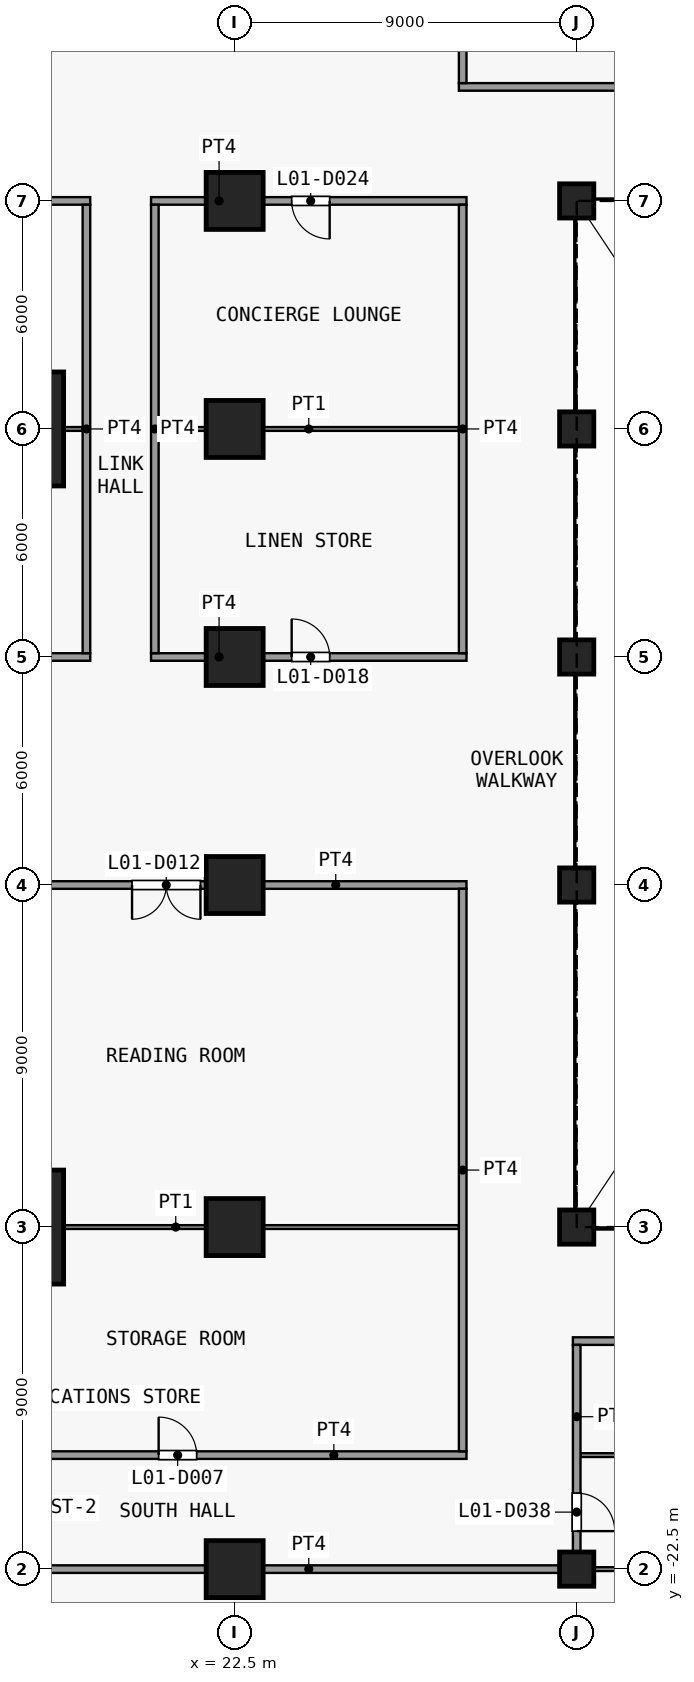
"""IFC4 building model, lengths in metres.
Left out: names, types, materials, properties, quantities, classifications, styles, units other than length and angle.
Written with IfcOpenShell. Run it as: python <this file> out.ifc"""

import sys

from ifc_helpers import new_model, si_unit, direction, frame, frame_2d, origin, origin_2d, place, context, subcontext, project, spatial, rectangle, extrude, element, fill, save


model = new_model("IFC4")
c1 = context("Model", 3, precision=1e-05, world=origin(), true_north=direction((0.0, 1.0)))
c2 = subcontext(c1, "Body", "Model", "MODEL_VIEW")
j1 = project(units=[si_unit("LENGTHUNIT", "METRE"), si_unit("PLANEANGLEUNIT", "RADIAN")], contexts=[c1])
p1 = place(None, origin())
s1 = spatial("IfcSite", under=j1, at=p1, CompositionType="ELEMENT")
p2 = place(p1, origin())
s2 = spatial("IfcBuilding", under=s1, at=p2, CompositionType="ELEMENT")
p3 = place(p2, frame((0.0, 0.0, 8.0)))
s3 = spatial("IfcBuildingStorey", under=s2, at=p3, CompositionType="ELEMENT", Elevation=8.0)
for number, where, z_axis, x_axis in (
    (1, (16.5, -13.5, 0.0), (0.0, 0.0, 1.0), (1.0, 0.0, 0.0)),
    (2, (16.5, 7.5, 0.0), (0.0, 0.0, 1.0), (1.0, 0.0, 0.0)),
):
    element("IfcColumn", number, at=place(p3, frame(where, z_axis=z_axis, x_axis=x_axis)), inside=s3, PredefinedType="COLUMN", context=c2, shape_type="SweptSolid", body=[
        extrude(rectangle(XDim=3.0, YDim=3.0, at=origin_2d()), origin(), (0.0, 0.0, 1.0), 5.5),
    ])
for number, where, z_axis, x_axis in (
    (3, (22.5, -22.5, 0.0), (0.0, 0.0, 1.0), (1.0, 0.0, 0.0)),
    (4, (22.5, -13.5, 0.0), (0.0, 0.0, 1.0), (1.0, 0.0, 0.0)),
    (5, (22.5, -4.5, 0.0), (0.0, 0.0, 1.0), (1.0, 0.0, 0.0)),
    (6, (22.5, 1.5, 0.0), (0.0, 0.0, 1.0), (1.0, 0.0, 0.0)),
    (7, (22.5, 7.5, 0.0), (0.0, 0.0, 1.0), (1.0, 0.0, 0.0)),
    (8, (22.5, 13.5, 0.0), (0.0, 0.0, 1.0), (1.0, 0.0, 0.0)),
):
    element("IfcColumn", number, at=place(p3, frame(where, z_axis=z_axis, x_axis=x_axis)), inside=s3, PredefinedType="COLUMN", context=c2, shape_type="SweptSolid", body=[
        extrude(rectangle(XDim=1.5, YDim=1.5, at=origin_2d()), origin(), (0.0, 0.0, 1.0), 5.5),
    ])
for number, where, z_axis, x_axis in (
    (9, (31.5, -22.5, 0.0), (0.0, 0.0, 1.0), (1.0, 0.0, 0.0)),
    (10, (31.5, -13.5, 0.0), (0.0, 0.0, 1.0), (1.0, 0.0, 0.0)),
    (11, (31.5, -4.5, 0.0), (0.0, 0.0, 1.0), (1.0, 0.0, 0.0)),
    (12, (31.5, 1.5, 0.0), (0.0, 0.0, 1.0), (1.0, 0.0, 0.0)),
    (13, (31.5, 7.5, 0.0), (0.0, 0.0, 1.0), (1.0, 0.0, 0.0)),
    (14, (31.5, 13.5, 0.0), (0.0, 0.0, 1.0), (1.0, 0.0, 0.0)),
):
    element("IfcColumn", number, at=place(p3, frame(where, z_axis=z_axis, x_axis=x_axis)), inside=s3, PredefinedType="COLUMN", context=c2, shape_type="SweptSolid", body=[
        extrude(rectangle(XDim=0.9, YDim=0.9, at=origin_2d()), origin(), (0.0, 0.0, 1.0), 5.5),
    ])
p4 = place(p3, frame((17.4, -22.5, 0.0), z_axis=(0.0, 0.0, 1.0), x_axis=(1.0, 0.0, 0.0)))
e15 = element("IfcWall", 15, at=p4, inside=s3, PredefinedType="PARTITIONING", context=c2, shape_type="SweptSolid", body=[
    extrude(rectangle(XDim=14.1, YDim=0.2, at=frame_2d((7.05, 0.0))), origin(), (0.0, 0.0, 1.0), 5.15),
])
p5 = place(p3, frame((31.5, -22.5, 0.0), z_axis=(0.0, 0.0, 1.0), x_axis=(1.0, 0.0, 0.0)))
e16 = element("IfcWall", 16, at=p5, inside=s3, PredefinedType="PARTITIONING", context=c2, shape_type="SweptSolid", body=[
    extrude(rectangle(XDim=20.95, YDim=0.1, at=frame_2d((10.475, 0.0))), origin(), (0.0, 0.0, 1.0), 5.15),
])
p6 = place(p3, frame((13.5, -19.5, 0.0), z_axis=(0.0, 0.0, 1.0), x_axis=(1.0, 0.0, 0.0)))
e17 = element("IfcWall", 17, at=p6, inside=s3, PredefinedType="PARTITIONING", context=c2, shape_type="SweptSolid", body=[
    extrude(rectangle(XDim=15.1, YDim=0.2, at=frame_2d((7.55, 0.0))), origin(), (0.0, 0.0, 1.0), 5.15),
])
p7 = place(p6, frame((7.0, 0.0, 0.0)))
e18 = element("IfcOpeningElement", 18, at=p7, cuts=e17, PredefinedType="OPENING", context=c2, shape_type="SweptSolid", body=[
    extrude(rectangle(XDim=1.0, YDim=2.1, at=frame_2d((0.5, 1.05))), frame((0.0, 0.11, 0.0), z_axis=(0.0, -1.0, 0.0), x_axis=(1.0, 0.0, 0.0)), (0.0, 0.0, 1.0), 0.22),
])
p8 = place(p3, frame((31.6, -19.5, 0.0), z_axis=(0.0, 0.0, 1.0), x_axis=(1.0, 0.0, 0.0)))
e19 = element("IfcWall", 19, at=p8, inside=s3, PredefinedType="PARTITIONING", context=c2, shape_type="SweptSolid", body=[
    extrude(rectangle(XDim=20.85, YDim=0.1, at=frame_2d((10.425, 0.0))), origin(), (0.0, 0.0, 1.0), 5.15),
])
p9 = place(p3, frame((31.4, -16.5, 0.0), z_axis=(0.0, 0.0, 1.0), x_axis=(1.0, 0.0, 0.0)))
e20 = element("IfcWall", 20, at=p9, inside=s3, PredefinedType="PARTITIONING", context=c2, shape_type="SweptSolid", body=[
    extrude(rectangle(XDim=21.0, YDim=0.2, at=frame_2d((10.5, 0.0))), origin(), (0.0, 0.0, 1.0), 5.15),
])
p10 = place(p9, frame((3.2, 0.0, 0.0)))
e21 = element("IfcOpeningElement", 21, at=p10, cuts=e20, PredefinedType="OPENING", context=c2, shape_type="SweptSolid", body=[
    extrude(rectangle(XDim=1.0, YDim=2.1, at=frame_2d((0.5, 1.05))), frame((0.0, 0.11, 0.0), z_axis=(0.0, -1.0, 0.0), x_axis=(1.0, 0.0, 0.0)), (0.0, 0.0, 1.0), 0.22),
])
p11 = place(p9, frame((14.0, 0.0, 0.0)))
e22 = element("IfcOpeningElement", 22, at=p11, cuts=e20, PredefinedType="OPENING", context=c2, shape_type="SweptSolid", body=[
    extrude(rectangle(XDim=1.0, YDim=2.1, at=frame_2d((0.5, 1.05))), frame((0.0, 0.11, 0.0), z_axis=(0.0, -1.0, 0.0), x_axis=(1.0, 0.0, 0.0)), (0.0, 0.0, 1.0), 0.22),
])
p12 = place(p3, frame((13.5, -13.5, 0.0), z_axis=(0.0, 0.0, 1.0), x_axis=(1.0, 0.0, 0.0)))
e23 = element("IfcWall", 23, at=p12, inside=s3, PredefinedType="PARTITIONING", context=c2, shape_type="SweptSolid", body=[
    extrude(rectangle(XDim=14.9, YDim=0.1, at=frame_2d((7.45, 0.0))), origin(), (0.0, 0.0, 1.0), 5.15),
])
p13 = place(p3, frame((13.4, -4.5, 0.0), z_axis=(0.0, 0.0, 1.0), x_axis=(1.0, 0.0, 0.0)))
e24 = element("IfcWall", 24, at=p13, inside=s3, PredefinedType="PARTITIONING", context=c2, shape_type="SweptSolid", body=[
    extrude(rectangle(XDim=15.2, YDim=0.2, at=frame_2d((7.6, 0.0))), origin(), (0.0, 0.0, 1.0), 5.15),
])
p14 = place(p13, frame((6.4, 0.0, 0.0)))
e25 = element("IfcOpeningElement", 25, at=p14, cuts=e24, PredefinedType="OPENING", context=c2, shape_type="SweptSolid", body=[
    extrude(rectangle(XDim=1.8, YDim=2.1, at=frame_2d((0.9, 1.05))), frame((0.0, 0.11, 0.0), z_axis=(0.0, -1.0, 0.0), x_axis=(1.0, 0.0, 0.0)), (0.0, 0.0, 1.0), 0.22),
])
p15 = place(p3, frame((0.8, 1.5, 0.0), z_axis=(0.0, 0.0, 1.0), x_axis=(1.0, 0.0, 0.0)))
e26 = element("IfcWall", 26, at=p15, inside=s3, PredefinedType="PARTITIONING", context=c2, shape_type="SweptSolid", body=[
    extrude(rectangle(XDim=17.9, YDim=0.2, at=frame_2d((8.95, 0.0))), origin(), (0.0, 0.0, 1.0), 5.15),
])
p16 = place(p15, frame((1.8, 0.0, 0.0)))
e27 = element("IfcOpeningElement", 27, at=p16, cuts=e26, PredefinedType="OPENING", context=c2, shape_type="SweptSolid", body=[
    extrude(rectangle(XDim=1.0, YDim=2.1, at=frame_2d((0.5, 1.05))), frame((0.0, 0.11, 0.0), z_axis=(0.0, -1.0, 0.0), x_axis=(1.0, 0.0, 0.0)), (0.0, 0.0, 1.0), 0.22),
])
p17 = place(p15, frame((13.8, 0.0, 0.0)))
e28 = element("IfcOpeningElement", 28, at=p17, cuts=e26, PredefinedType="OPENING", context=c2, shape_type="SweptSolid", body=[
    extrude(rectangle(XDim=1.0, YDim=2.1, at=frame_2d((0.5, 1.05))), frame((0.0, 0.11, 0.0), z_axis=(0.0, -1.0, 0.0), x_axis=(1.0, 0.0, 0.0)), (0.0, 0.0, 1.0), 0.22),
])
p18 = place(p3, frame((20.3, 1.5, 0.0), z_axis=(0.0, 0.0, 1.0), x_axis=(1.0, 0.0, 0.0)))
e29 = element("IfcWall", 29, at=p18, inside=s3, PredefinedType="PARTITIONING", context=c2, shape_type="SweptSolid", body=[
    extrude(rectangle(XDim=8.3, YDim=0.2, at=frame_2d((4.15, 0.0))), origin(), (0.0, 0.0, 1.0), 5.15),
])
p19 = place(p18, frame((3.7, 0.0, 0.0)))
e30 = element("IfcOpeningElement", 30, at=p19, cuts=e29, PredefinedType="OPENING", context=c2, shape_type="SweptSolid", body=[
    extrude(rectangle(XDim=1.0, YDim=2.1, at=frame_2d((0.5, 1.05))), frame((0.0, 0.11, 0.0), z_axis=(0.0, -1.0, 0.0), x_axis=(1.0, 0.0, 0.0)), (0.0, 0.0, 1.0), 0.22),
])
p20 = place(p3, frame((1.0, 7.5, 0.0), z_axis=(0.0, 0.0, 1.0), x_axis=(1.0, 0.0, 0.0)))
e31 = element("IfcWall", 31, at=p20, inside=s3, PredefinedType="PARTITIONING", context=c2, shape_type="SweptSolid", body=[
    extrude(rectangle(XDim=17.5, YDim=0.1, at=frame_2d((8.75, 0.0))), origin(), (0.0, 0.0, 1.0), 5.15),
])
p21 = place(p3, frame((20.5, 7.5, 0.0), z_axis=(0.0, 0.0, 1.0), x_axis=(1.0, 0.0, 0.0)))
e32 = element("IfcWall", 32, at=p21, inside=s3, PredefinedType="PARTITIONING", context=c2, shape_type="SweptSolid", body=[
    extrude(rectangle(XDim=7.9, YDim=0.1, at=frame_2d((3.95, 0.0))), origin(), (0.0, 0.0, 1.0), 5.15),
])
p22 = place(p3, frame((0.8, 13.5, 0.0), z_axis=(0.0, 0.0, 1.0), x_axis=(1.0, 0.0, 0.0)))
e33 = element("IfcWall", 33, at=p22, inside=s3, PredefinedType="PARTITIONING", context=c2, shape_type="SweptSolid", body=[
    extrude(rectangle(XDim=17.9, YDim=0.2, at=frame_2d((8.95, 0.0))), origin(), (0.0, 0.0, 1.0), 5.15),
])
p23 = place(p22, frame((1.8, 0.0, 0.0)))
e34 = element("IfcOpeningElement", 34, at=p23, cuts=e33, PredefinedType="OPENING", context=c2, shape_type="SweptSolid", body=[
    extrude(rectangle(XDim=1.0, YDim=2.1, at=frame_2d((0.5, 1.05))), frame((0.0, 0.11, 0.0), z_axis=(0.0, -1.0, 0.0), x_axis=(1.0, 0.0, 0.0)), (0.0, 0.0, 1.0), 0.22),
])
p24 = place(p22, frame((13.8, 0.0, 0.0)))
e35 = element("IfcOpeningElement", 35, at=p24, cuts=e33, PredefinedType="OPENING", context=c2, shape_type="SweptSolid", body=[
    extrude(rectangle(XDim=1.0, YDim=2.1, at=frame_2d((0.5, 1.05))), frame((0.0, 0.11, 0.0), z_axis=(0.0, -1.0, 0.0), x_axis=(1.0, 0.0, 0.0)), (0.0, 0.0, 1.0), 0.22),
])
p25 = place(p3, frame((20.3, 13.5, 0.0), z_axis=(0.0, 0.0, 1.0), x_axis=(1.0, 0.0, 0.0)))
e36 = element("IfcWall", 36, at=p25, inside=s3, PredefinedType="PARTITIONING", context=c2, shape_type="SweptSolid", body=[
    extrude(rectangle(XDim=8.3, YDim=0.2, at=frame_2d((4.15, 0.0))), origin(), (0.0, 0.0, 1.0), 5.15),
])
p26 = place(p25, frame((3.7, 0.0, 0.0)))
e37 = element("IfcOpeningElement", 37, at=p26, cuts=e36, PredefinedType="OPENING", context=c2, shape_type="SweptSolid", body=[
    extrude(rectangle(XDim=1.0, YDim=2.1, at=frame_2d((0.5, 1.05))), frame((0.0, 0.11, 0.0), z_axis=(0.0, -1.0, 0.0), x_axis=(1.0, 0.0, 0.0)), (0.0, 0.0, 1.0), 0.22),
])
p27 = place(p3, frame((28.4, 16.5, 0.0), z_axis=(0.0, 0.0, 1.0), x_axis=(1.0, 0.0, 0.0)))
e38 = element("IfcWall", 38, at=p27, inside=s3, PredefinedType="PARTITIONING", context=c2, shape_type="SweptSolid", body=[
    extrude(rectangle(XDim=24.2, YDim=0.2, at=frame_2d((12.1, 0.0))), origin(), (0.0, 0.0, 1.0), 5.15),
])
p28 = place(p27, frame((6.2, 0.0, 0.0)))
e39 = element("IfcOpeningElement", 39, at=p28, cuts=e38, PredefinedType="OPENING", context=c2, shape_type="SweptSolid", body=[
    extrude(rectangle(XDim=1.0, YDim=2.1, at=frame_2d((0.5, 1.05))), frame((0.0, 0.11, 0.0), z_axis=(0.0, -1.0, 0.0), x_axis=(1.0, 0.0, 0.0)), (0.0, 0.0, 1.0), 0.22),
])
p29 = place(p27, frame((17.0, 0.0, 0.0)))
e40 = element("IfcOpeningElement", 40, at=p29, cuts=e38, PredefinedType="OPENING", context=c2, shape_type="SweptSolid", body=[
    extrude(rectangle(XDim=1.0, YDim=2.1, at=frame_2d((0.5, 1.05))), frame((0.0, 0.11, 0.0), z_axis=(0.0, -1.0, 0.0), x_axis=(1.0, 0.0, 0.0)), (0.0, 0.0, 1.0), 0.22),
])
for number, where, z_axis, x_axis in (
    (41, (18.6, 1.6, 0.0), (0.0, 0.0, 1.0), (0.0, 1.0, 0.0)),
    (42, (20.4, 1.6, 0.0), (0.0, 0.0, 1.0), (0.0, 1.0, 0.0)),
):
    element("IfcWall", number, at=place(p3, frame(where, z_axis=z_axis, x_axis=x_axis)), inside=s3, PredefinedType="PARTITIONING", context=c2, shape_type="SweptSolid", body=[
        extrude(rectangle(XDim=11.8, YDim=0.2, at=frame_2d((5.9, 0.0))), origin(), (0.0, 0.0, 1.0), 5.15),
    ])
p30 = place(p3, frame((28.5, -19.4, 0.0), z_axis=(0.0, 0.0, 1.0), x_axis=(0.0, 1.0, 0.0)))
e43 = element("IfcWall", 43, at=p30, inside=s3, PredefinedType="PARTITIONING", context=c2, shape_type="SweptSolid", body=[
    extrude(rectangle(XDim=14.8, YDim=0.2, at=frame_2d((7.4, 0.0))), origin(), (0.0, 0.0, 1.0), 5.15),
])
p31 = place(p3, frame((28.5, 1.6, 0.0), z_axis=(0.0, 0.0, 1.0), x_axis=(0.0, 1.0, 0.0)))
e44 = element("IfcWall", 44, at=p31, inside=s3, PredefinedType="PARTITIONING", context=c2, shape_type="SweptSolid", body=[
    extrude(rectangle(XDim=11.8, YDim=0.2, at=frame_2d((5.9, 0.0))), origin(), (0.0, 0.0, 1.0), 5.15),
])
p32 = place(p3, frame((28.5, 16.6, 0.0), z_axis=(0.0, 0.0, 1.0), x_axis=(0.0, 1.0, 0.0)))
e45 = element("IfcWall", 45, at=p32, inside=s3, PredefinedType="PARTITIONING", context=c2, shape_type="SweptSolid", body=[
    extrude(rectangle(XDim=2.8, YDim=0.2, at=frame_2d((1.4, 0.0))), origin(), (0.0, 0.0, 1.0), 5.15),
])
p33 = place(p3, frame((31.5, -22.4, 0.0), z_axis=(0.0, 0.0, 1.0), x_axis=(0.0, 1.0, 0.0)))
e46 = element("IfcWall", 46, at=p33, inside=s3, PredefinedType="PARTITIONING", context=c2, shape_type="SweptSolid", body=[
    extrude(rectangle(XDim=5.8, YDim=0.2, at=frame_2d((2.9, 0.0))), origin(), (0.0, 0.0, 1.0), 5.15),
])
p34 = place(p33, frame((0.9, 0.0, 0.0)))
e47 = element("IfcOpeningElement", 47, at=p34, cuts=e46, PredefinedType="OPENING", context=c2, shape_type="SweptSolid", body=[
    extrude(rectangle(XDim=1.0, YDim=2.1, at=frame_2d((0.5, 1.05))), frame((0.0, 0.11, 0.0), z_axis=(0.0, -1.0, 0.0), x_axis=(1.0, 0.0, 0.0)), (0.0, 0.0, 1.0), 0.22),
])
p35 = place(p7, origin())
e48 = element("IfcDoor", 48, at=p35, inside=s3, OperationType="SINGLE_SWING_RIGHT", PredefinedType="DOOR", context=c2, shape_type="SweptSolid", body=[
    extrude(rectangle(XDim=1.0, YDim=2.1, at=frame_2d((0.5, 1.05))), frame((0.0, 0.025, 0.0), z_axis=(0.0, -1.0, 0.0), x_axis=(1.0, 0.0, 0.0)), (0.0, 0.0, 1.0), 0.05),
])
fill(e18, e48)
p36 = place(p14, origin())
e49 = element("IfcDoor", 49, at=p36, inside=s3, OperationType="DOUBLE_DOOR_SINGLE_SWING", PredefinedType="DOOR", context=c2, shape_type="SweptSolid", body=[
    extrude(rectangle(XDim=1.8, YDim=2.1, at=frame_2d((0.9, 1.05))), frame((0.0, 0.025, 0.0), z_axis=(0.0, -1.0, 0.0), x_axis=(1.0, 0.0, 0.0)), (0.0, 0.0, 1.0), 0.05),
])
fill(e25, e49)
p37 = place(p19, origin())
e50 = element("IfcDoor", 50, at=p37, inside=s3, OperationType="SINGLE_SWING_RIGHT", PredefinedType="DOOR", context=c2, shape_type="SweptSolid", body=[
    extrude(rectangle(XDim=1.0, YDim=2.1, at=frame_2d((0.5, 1.05))), frame((0.0, 0.025, 0.0), z_axis=(0.0, -1.0, 0.0), x_axis=(1.0, 0.0, 0.0)), (0.0, 0.0, 1.0), 0.05),
])
fill(e30, e50)
p38 = place(p26, origin())
e51 = element("IfcDoor", 51, at=p38, inside=s3, OperationType="SINGLE_SWING_RIGHT", PredefinedType="DOOR", context=c2, shape_type="SweptSolid", body=[
    extrude(rectangle(XDim=1.0, YDim=2.1, at=frame_2d((0.5, 1.05))), frame((0.0, 0.025, 0.0), z_axis=(0.0, -1.0, 0.0), x_axis=(1.0, 0.0, 0.0)), (0.0, 0.0, 1.0), 0.05),
])
fill(e37, e51)
p39 = place(p34, origin())
e52 = element("IfcDoor", 52, at=p39, inside=s3, OperationType="SINGLE_SWING_LEFT", PredefinedType="DOOR", context=c2, shape_type="SweptSolid", body=[
    extrude(rectangle(XDim=1.0, YDim=2.1, at=frame_2d((0.5, 1.05))), frame((0.0, 0.025, 0.0), z_axis=(0.0, -1.0, 0.0), x_axis=(1.0, 0.0, 0.0)), (0.0, 0.0, 1.0), 0.05),
])
fill(e47, e52)
save(model, sys.argv[1])
